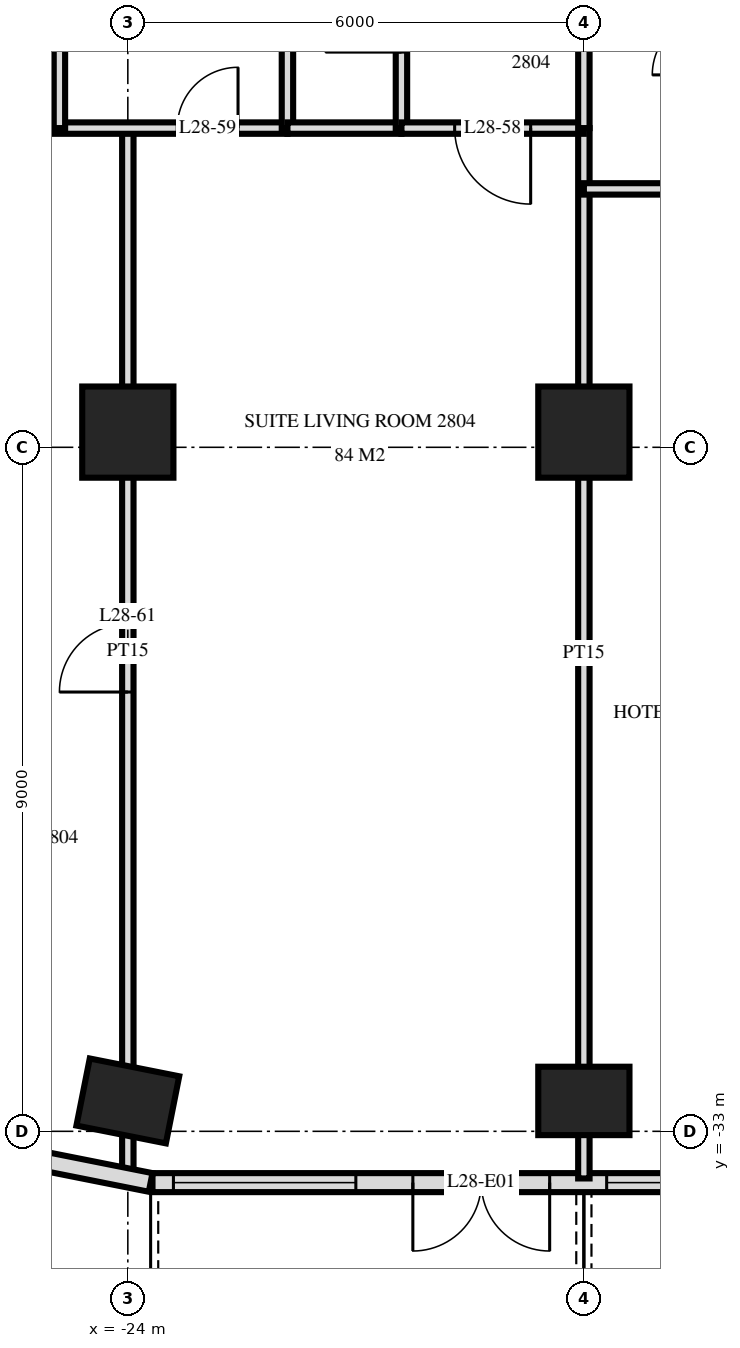
"""IFC4 building model, lengths in metres.
Left out: names, types, materials, properties, quantities, classifications, styles, units other than length and angle.
Written with IfcOpenShell. Run it as: python <this file> out.ifc"""

import sys

from ifc_helpers import new_model, si_unit, direction, frame, frame_2d, origin, origin_2d, place, context, subcontext, project, spatial, rectangle, extrude, element, fill, save


model = new_model("IFC4")
c1 = context("Model", 3, precision=1e-05, world=origin(), true_north=direction((0.0, 1.0)))
c2 = subcontext(c1, "Body", "Model", "MODEL_VIEW")
j1 = project(units=[si_unit("LENGTHUNIT", "METRE"), si_unit("PLANEANGLEUNIT", "RADIAN")], contexts=[c1])
p1 = place(None, origin())
s1 = spatial("IfcSite", under=j1, at=p1, CompositionType="ELEMENT")
p2 = place(p1, origin())
s2 = spatial("IfcBuilding", under=s1, at=p2, CompositionType="ELEMENT")
p3 = place(p2, frame((0.0, 0.0, 112.8)))
s3 = spatial("IfcBuildingStorey", under=s2, at=p3, CompositionType="ELEMENT", Elevation=112.8)
p4 = place(p3, frame((-24.0, -32.6, -0.28), z_axis=(0.0, 0.0, 1.0), x_axis=(-0.980792089743, 0.195056086032, 0.0)))
e1 = element("IfcColumn", 1, at=p4, inside=s3, PredefinedType="COLUMN", context=c2, shape_type="SweptSolid", body=[
    extrude(rectangle(XDim=1.2, YDim=0.9, at=origin_2d()), origin(), (0.0, 0.0, 1.0), 3.88),
])
p5 = place(p3, frame((-24.0, -23.8, -0.28), z_axis=(0.0, 0.0, 1.0), x_axis=(1.0, 0.0, 0.0)))
e2 = element("IfcColumn", 2, at=p5, inside=s3, PredefinedType="COLUMN", context=c2, shape_type="SweptSolid", body=[
    extrude(rectangle(XDim=1.2, YDim=1.2, at=origin_2d()), origin(), (0.0, 0.0, 1.0), 3.88),
])
p6 = place(p3, frame((-18.0, -32.6, -0.28), z_axis=(0.0, 0.0, 1.0), x_axis=(1.0, 0.0, 0.0)))
e3 = element("IfcColumn", 3, at=p6, inside=s3, PredefinedType="COLUMN", context=c2, shape_type="SweptSolid", body=[
    extrude(rectangle(XDim=1.2, YDim=0.9, at=origin_2d()), origin(), (0.0, 0.0, 1.0), 3.88),
])
p7 = place(p3, frame((-18.0, -23.8, -0.28), z_axis=(0.0, 0.0, 1.0), x_axis=(1.0, 0.0, 0.0)))
e4 = element("IfcColumn", 4, at=p7, inside=s3, PredefinedType="COLUMN", context=c2, shape_type="SweptSolid", body=[
    extrude(rectangle(XDim=1.2, YDim=1.2, at=origin_2d()), origin(), (0.0, 0.0, 1.0), 3.88),
])
p8 = place(p3, frame((-25.349, -33.344, 0.0), z_axis=(0.0, 0.0, 1.0), x_axis=(0.980775640221, -0.19513878023, 0.0)))
e5 = element("IfcWall", 5, at=p8, inside=s3, PredefinedType="SOLIDWALL", context=c2, shape_type="SweptSolid", body=[
    extrude(rectangle(XDim=1.681, YDim=0.25, at=frame_2d((0.841, 0.0))), origin(), (0.0, 0.0, 1.0), 3.32),
])
p9 = place(p3, frame((-23.675, -33.675, 0.0), z_axis=(0.0, 0.0, 1.0), x_axis=(1.0, 0.0, 0.0)))
e6 = element("IfcWall", 6, at=p9, inside=s3, PredefinedType="SOLIDWALL", context=c2, shape_type="SweptSolid", body=[
    extrude(rectangle(XDim=47.351, YDim=0.25, at=frame_2d((23.675, 0.0))), origin(), (0.0, 0.0, 1.0), 3.32),
])
p10 = place(p9, frame((0.275, 0.0, 0.3)))
e7 = element("IfcOpeningElement", 7, at=p10, cuts=e6, PredefinedType="OPENING", context=c2, shape_type="SweptSolid", body=[
    extrude(rectangle(XDim=2.4, YDim=2.1, at=frame_2d((1.2, 1.05))), frame((0.0, 0.135, 0.0), z_axis=(0.0, -1.0, 0.0), x_axis=(1.0, 0.0, 0.0)), (0.0, 0.0, 1.0), 0.27),
])
p11 = place(p9, frame((3.425, 0.0, 0.0)))
e8 = element("IfcOpeningElement", 8, at=p11, cuts=e6, PredefinedType="OPENING", context=c2, shape_type="SweptSolid", body=[
    extrude(rectangle(XDim=1.8, YDim=2.4, at=frame_2d((0.9, 1.2))), frame((0.0, 0.135, 0.0), z_axis=(0.0, -1.0, 0.0), x_axis=(1.0, 0.0, 0.0)), (0.0, 0.0, 1.0), 0.27),
])
p12 = place(p9, frame((5.975, 0.0, 0.3)))
e9 = element("IfcOpeningElement", 9, at=p12, cuts=e6, PredefinedType="OPENING", context=c2, shape_type="SweptSolid", body=[
    extrude(rectangle(XDim=2.4, YDim=2.1, at=frame_2d((1.2, 1.05))), frame((0.0, 0.135, 0.0), z_axis=(0.0, -1.0, 0.0), x_axis=(1.0, 0.0, 0.0)), (0.0, 0.0, 1.0), 0.27),
])
p13 = place(p9, frame((9.275, 0.0, 0.0)))
e10 = element("IfcOpeningElement", 10, at=p13, cuts=e6, PredefinedType="OPENING", context=c2, shape_type="SweptSolid", body=[
    extrude(rectangle(XDim=1.8, YDim=2.4, at=frame_2d((0.9, 1.2))), frame((0.0, 0.135, 0.0), z_axis=(0.0, -1.0, 0.0), x_axis=(1.0, 0.0, 0.0)), (0.0, 0.0, 1.0), 0.27),
])
p14 = place(p9, frame((12.275, 0.0, 0.0)))
e11 = element("IfcOpeningElement", 11, at=p14, cuts=e6, PredefinedType="OPENING", context=c2, shape_type="SweptSolid", body=[
    extrude(rectangle(XDim=1.8, YDim=2.4, at=frame_2d((0.9, 1.2))), frame((0.0, 0.135, 0.0), z_axis=(0.0, -1.0, 0.0), x_axis=(1.0, 0.0, 0.0)), (0.0, 0.0, 1.0), 0.27),
])
p15 = place(p9, frame((14.975, 0.0, 0.3)))
e12 = element("IfcOpeningElement", 12, at=p15, cuts=e6, PredefinedType="OPENING", context=c2, shape_type="SweptSolid", body=[
    extrude(rectangle(XDim=2.4, YDim=2.1, at=frame_2d((1.2, 1.05))), frame((0.0, 0.135, 0.0), z_axis=(0.0, -1.0, 0.0), x_axis=(1.0, 0.0, 0.0)), (0.0, 0.0, 1.0), 0.27),
])
p16 = place(p9, frame((17.975, 0.0, 0.3)))
e13 = element("IfcOpeningElement", 13, at=p16, cuts=e6, PredefinedType="OPENING", context=c2, shape_type="SweptSolid", body=[
    extrude(rectangle(XDim=2.4, YDim=2.1, at=frame_2d((1.2, 1.05))), frame((0.0, 0.135, 0.0), z_axis=(0.0, -1.0, 0.0), x_axis=(1.0, 0.0, 0.0)), (0.0, 0.0, 1.0), 0.27),
])
p17 = place(p9, frame((21.275, 0.0, 0.0)))
e14 = element("IfcOpeningElement", 14, at=p17, cuts=e6, PredefinedType="OPENING", context=c2, shape_type="SweptSolid", body=[
    extrude(rectangle(XDim=1.8, YDim=2.4, at=frame_2d((0.9, 1.2))), frame((0.0, 0.135, 0.0), z_axis=(0.0, -1.0, 0.0), x_axis=(1.0, 0.0, 0.0)), (0.0, 0.0, 1.0), 0.27),
])
p18 = place(p9, frame((24.275, 0.0, 0.0)))
e15 = element("IfcOpeningElement", 15, at=p18, cuts=e6, PredefinedType="OPENING", context=c2, shape_type="SweptSolid", body=[
    extrude(rectangle(XDim=1.8, YDim=2.4, at=frame_2d((0.9, 1.2))), frame((0.0, 0.135, 0.0), z_axis=(0.0, -1.0, 0.0), x_axis=(1.0, 0.0, 0.0)), (0.0, 0.0, 1.0), 0.27),
])
p19 = place(p9, frame((26.975, 0.0, 0.3)))
e16 = element("IfcOpeningElement", 16, at=p19, cuts=e6, PredefinedType="OPENING", context=c2, shape_type="SweptSolid", body=[
    extrude(rectangle(XDim=2.4, YDim=2.1, at=frame_2d((1.2, 1.05))), frame((0.0, 0.135, 0.0), z_axis=(0.0, -1.0, 0.0), x_axis=(1.0, 0.0, 0.0)), (0.0, 0.0, 1.0), 0.27),
])
p20 = place(p9, frame((30.275, 0.0, 0.0)))
e17 = element("IfcOpeningElement", 17, at=p20, cuts=e6, PredefinedType="OPENING", context=c2, shape_type="SweptSolid", body=[
    extrude(rectangle(XDim=1.8, YDim=2.4, at=frame_2d((0.9, 1.2))), frame((0.0, 0.135, 0.0), z_axis=(0.0, -1.0, 0.0), x_axis=(1.0, 0.0, 0.0)), (0.0, 0.0, 1.0), 0.27),
])
p21 = place(p9, frame((32.975, 0.0, 0.3)))
e18 = element("IfcOpeningElement", 18, at=p21, cuts=e6, PredefinedType="OPENING", context=c2, shape_type="SweptSolid", body=[
    extrude(rectangle(XDim=2.4, YDim=2.1, at=frame_2d((1.2, 1.05))), frame((0.0, 0.135, 0.0), z_axis=(0.0, -1.0, 0.0), x_axis=(1.0, 0.0, 0.0)), (0.0, 0.0, 1.0), 0.27),
])
p22 = place(p9, frame((35.975, 0.0, 0.3)))
e19 = element("IfcOpeningElement", 19, at=p22, cuts=e6, PredefinedType="OPENING", context=c2, shape_type="SweptSolid", body=[
    extrude(rectangle(XDim=2.4, YDim=2.1, at=frame_2d((1.2, 1.05))), frame((0.0, 0.135, 0.0), z_axis=(0.0, -1.0, 0.0), x_axis=(1.0, 0.0, 0.0)), (0.0, 0.0, 1.0), 0.27),
])
p23 = place(p9, frame((39.275, 0.0, 0.0)))
e20 = element("IfcOpeningElement", 20, at=p23, cuts=e6, PredefinedType="OPENING", context=c2, shape_type="SweptSolid", body=[
    extrude(rectangle(XDim=1.8, YDim=2.4, at=frame_2d((0.9, 1.2))), frame((0.0, 0.135, 0.0), z_axis=(0.0, -1.0, 0.0), x_axis=(1.0, 0.0, 0.0)), (0.0, 0.0, 1.0), 0.27),
])
p24 = place(p9, frame((41.975, 0.0, 0.3)))
e21 = element("IfcOpeningElement", 21, at=p24, cuts=e6, PredefinedType="OPENING", context=c2, shape_type="SweptSolid", body=[
    extrude(rectangle(XDim=2.4, YDim=2.1, at=frame_2d((1.2, 1.05))), frame((0.0, 0.135, 0.0), z_axis=(0.0, -1.0, 0.0), x_axis=(1.0, 0.0, 0.0)), (0.0, 0.0, 1.0), 0.27),
])
p25 = place(p9, frame((45.125, 0.0, 0.0)))
e22 = element("IfcOpeningElement", 22, at=p25, cuts=e6, PredefinedType="OPENING", context=c2, shape_type="SweptSolid", body=[
    extrude(rectangle(XDim=1.8, YDim=2.4, at=frame_2d((0.9, 1.2))), frame((0.0, 0.135, 0.0), z_axis=(0.0, -1.0, 0.0), x_axis=(1.0, 0.0, 0.0)), (0.0, 0.0, 1.0), 0.27),
])
p26 = place(p3, frame((-18.0, -19.8, 0.0), z_axis=(0.0, 0.0, 1.0), x_axis=(0.0, 1.0, 0.0)))
e23 = element("IfcWall", 23, at=p26, inside=s3, PredefinedType="PARTITIONING", context=c2, shape_type="SweptSolid", body=[
    extrude(rectangle(XDim=3.0, YDim=0.15, at=frame_2d((1.5, 0.0))), origin(), (0.0, 0.0, 1.0), 3.32),
])
p27 = place(p3, frame((-18.0, -33.62, 0.0), z_axis=(0.0, 0.0, 1.0), x_axis=(0.0, 1.0, 0.0)))
e24 = element("IfcWall", 24, at=p27, inside=s3, PredefinedType="PARTITIONING", context=c2, shape_type="SweptSolid", body=[
    extrude(rectangle(XDim=13.82, YDim=0.15, at=frame_2d((6.91, 0.0))), origin(), (0.0, 0.0, 1.0), 3.32),
])
p28 = place(p3, frame((-20.4, -19.8, 0.0), z_axis=(0.0, 0.0, 1.0), x_axis=(0.0, 1.0, 0.0)))
e25 = element("IfcWall", 25, at=p28, inside=s3, PredefinedType="PARTITIONING", context=c2, shape_type="SweptSolid", body=[
    extrude(rectangle(XDim=3.0, YDim=0.15, at=frame_2d((1.5, 0.0))), origin(), (0.0, 0.0, 1.0), 3.32),
])
p29 = place(p28, frame((1.0, 0.0, 0.0)))
e26 = element("IfcOpeningElement", 26, at=p29, cuts=e25, PredefinedType="OPENING", context=c2, shape_type="SweptSolid", body=[
    extrude(rectangle(XDim=1.0, YDim=2.1, at=frame_2d((0.5, 1.05))), frame((0.0, 0.085, 0.0), z_axis=(0.0, -1.0, 0.0), x_axis=(1.0, 0.0, 0.0)), (0.0, 0.0, 1.0), 0.17),
])
p30 = place(p3, frame((-21.9, -19.8, 0.0), z_axis=(0.0, 0.0, 1.0), x_axis=(0.0, 1.0, 0.0)))
e27 = element("IfcWall", 27, at=p30, inside=s3, PredefinedType="PLUMBINGWALL", context=c2, shape_type="SweptSolid", body=[
    extrude(rectangle(XDim=3.0, YDim=0.15, at=frame_2d((1.5, 0.0))), origin(), (0.0, 0.0, 1.0), 3.32),
])
p31 = place(p3, frame((-24.0, -33.557, 0.0), z_axis=(0.0, 0.0, 1.0), x_axis=(0.0, 1.0, 0.0)))
e28 = element("IfcWall", 28, at=p31, inside=s3, PredefinedType="PARTITIONING", context=c2, shape_type="SweptSolid", body=[
    extrude(rectangle(XDim=13.757, YDim=0.15, at=frame_2d((6.878, 0.0))), origin(), (0.0, 0.0, 1.0), 3.32),
])
p32 = place(p31, frame((6.337, 0.0, 0.0)))
e29 = element("IfcOpeningElement", 29, at=p32, cuts=e28, PredefinedType="OPENING", context=c2, shape_type="SweptSolid", body=[
    extrude(rectangle(XDim=0.9, YDim=2.1, at=frame_2d((0.45, 1.05))), frame((0.0, 0.085, 0.0), z_axis=(0.0, -1.0, 0.0), x_axis=(1.0, 0.0, 0.0)), (0.0, 0.0, 1.0), 0.17),
])
p33 = place(p3, frame((-24.9, -19.8, 0.0), z_axis=(0.0, 0.0, 1.0), x_axis=(0.0, 1.0, 0.0)))
e30 = element("IfcWall", 30, at=p33, inside=s3, PredefinedType="PARTITIONING", context=c2, shape_type="SweptSolid", body=[
    extrude(rectangle(XDim=3.0, YDim=0.15, at=frame_2d((1.5, 0.0))), origin(), (0.0, 0.0, 1.0), 3.32),
])
p34 = place(p3, frame((-18.0, -20.6, 0.0), z_axis=(0.0, 0.0, 1.0), x_axis=(1.0, 0.0, 0.0)))
e31 = element("IfcWall", 31, at=p34, inside=s3, PredefinedType="PARTITIONING", context=c2, shape_type="SweptSolid", body=[
    extrude(rectangle(XDim=1.7, YDim=0.15, at=frame_2d((0.85, 0.0))), origin(), (0.0, 0.0, 1.0), 3.32),
])
p35 = place(p3, frame((-20.4, -19.8, 0.0), z_axis=(0.0, 0.0, 1.0), x_axis=(1.0, 0.0, 0.0)))
e32 = element("IfcWall", 32, at=p35, inside=s3, PredefinedType="PARTITIONING", context=c2, shape_type="SweptSolid", body=[
    extrude(rectangle(XDim=2.4, YDim=0.15, at=frame_2d((1.2, 0.0))), origin(), (0.0, 0.0, 1.0), 3.32),
])
p36 = place(p35, frame((0.7, 0.0, 0.0)))
e33 = element("IfcOpeningElement", 33, at=p36, cuts=e32, PredefinedType="OPENING", context=c2, shape_type="SweptSolid", body=[
    extrude(rectangle(XDim=1.0, YDim=2.1, at=frame_2d((0.5, 1.05))), frame((0.0, 0.085, 0.0), z_axis=(0.0, -1.0, 0.0), x_axis=(1.0, 0.0, 0.0)), (0.0, 0.0, 1.0), 0.17),
])
p37 = place(p3, frame((-28.02, -19.8, 0.0), z_axis=(0.0, 0.0, 1.0), x_axis=(1.0, 0.0, 0.0)))
e34 = element("IfcWall", 34, at=p37, inside=s3, PredefinedType="PARTITIONING", context=c2, shape_type="SweptSolid", body=[
    extrude(rectangle(XDim=6.12, YDim=0.15, at=frame_2d((3.06, 0.0))), origin(), (0.0, 0.0, 1.0), 3.32),
])
p38 = place(p37, frame((4.67, 0.0, 0.0)))
e35 = element("IfcOpeningElement", 35, at=p38, cuts=e34, PredefinedType="OPENING", context=c2, shape_type="SweptSolid", body=[
    extrude(rectangle(XDim=0.8, YDim=2.1, at=frame_2d((0.4, 1.05))), frame((0.0, 0.085, 0.0), z_axis=(0.0, -1.0, 0.0), x_axis=(1.0, 0.0, 0.0)), (0.0, 0.0, 1.0), 0.17),
])
p39 = place(p37, frame((1.02, 0.0, 0.0)))
e36 = element("IfcOpeningElement", 36, at=p39, cuts=e34, PredefinedType="OPENING", context=c2, shape_type="SweptSolid", body=[
    extrude(rectangle(XDim=0.9, YDim=2.1, at=frame_2d((0.45, 1.05))), frame((0.0, 0.085, 0.0), z_axis=(0.0, -1.0, 0.0), x_axis=(1.0, 0.0, 0.0)), (0.0, 0.0, 1.0), 0.17),
])
p40 = place(p3, frame((-21.9, -19.8, 0.0), z_axis=(0.0, 0.0, 1.0), x_axis=(1.0, 0.0, 0.0)))
e37 = element("IfcWall", 37, at=p40, inside=s3, PredefinedType="PLUMBINGWALL", context=c2, shape_type="SweptSolid", body=[
    extrude(rectangle(XDim=1.5, YDim=0.15, at=frame_2d((0.75, 0.0))), origin(), (0.0, 0.0, 1.0), 3.32),
])
p41 = place(p10, origin())
e38 = element("IfcWindow", 38, at=p41, inside=s3, PartitioningType="SINGLE_PANEL", PredefinedType="WINDOW", context=c2, shape_type="SweptSolid", body=[
    extrude(rectangle(XDim=2.4, YDim=2.1, at=frame_2d((1.2, 1.05))), frame((0.0, 0.03, 0.0), z_axis=(0.0, -1.0, 0.0), x_axis=(1.0, 0.0, 0.0)), (0.0, 0.0, 1.0), 0.06),
])
fill(e7, e38)
p42 = place(p11, frame((0.9, 0.0, 0.0), z_axis=(0.0, 0.0, 1.0), x_axis=(-1.0, 0.0, 0.0)))
e39 = element("IfcDoor", 39, at=p42, inside=s3, OperationType="DOUBLE_DOOR_SINGLE_SWING", PredefinedType="DOOR", context=c2, shape_type="SweptSolid", body=[
    extrude(rectangle(XDim=1.8, YDim=2.4, at=frame_2d((0.0, 1.2))), frame((0.0, -0.025, 0.0), z_axis=(0.0, 1.0, 0.0), x_axis=(-1.0, 0.0, 0.0)), (0.0, 0.0, 1.0), 0.05),
])
fill(e8, e39)
p43 = place(p12, origin())
e40 = element("IfcWindow", 40, at=p43, inside=s3, PartitioningType="SINGLE_PANEL", PredefinedType="WINDOW", context=c2, shape_type="SweptSolid", body=[
    extrude(rectangle(XDim=2.4, YDim=2.1, at=frame_2d((1.2, 1.05))), frame((0.0, 0.03, 0.0), z_axis=(0.0, -1.0, 0.0), x_axis=(1.0, 0.0, 0.0)), (0.0, 0.0, 1.0), 0.06),
])
fill(e9, e40)
p44 = place(p36, frame((0.5, 0.0, 0.0), z_axis=(0.0, 0.0, 1.0), x_axis=(-1.0, 0.0, 0.0)))
e41 = element("IfcDoor", 41, at=p44, inside=s3, OperationType="SINGLE_SWING_RIGHT", PredefinedType="DOOR", context=c2, shape_type="SweptSolid", body=[
    extrude(rectangle(XDim=1.0, YDim=2.1, at=frame_2d((0.0, 1.05))), frame((0.0, -0.025, 0.0), z_axis=(0.0, 1.0, 0.0), x_axis=(-1.0, 0.0, 0.0)), (0.0, 0.0, 1.0), 0.05),
])
fill(e33, e41)
p45 = place(p38, origin())
e42 = element("IfcDoor", 42, at=p45, inside=s3, OperationType="SINGLE_SWING_LEFT", PredefinedType="DOOR", context=c2, shape_type="SweptSolid", body=[
    extrude(rectangle(XDim=0.8, YDim=2.1, at=frame_2d((0.4, 1.05))), frame((0.0, 0.025, 0.0), z_axis=(0.0, -1.0, 0.0), x_axis=(1.0, 0.0, 0.0)), (0.0, 0.0, 1.0), 0.05),
])
fill(e35, e42)
p46 = place(p32, origin())
e43 = element("IfcDoor", 43, at=p46, inside=s3, OperationType="SINGLE_SWING_RIGHT", PredefinedType="DOOR", context=c2, shape_type="SweptSolid", body=[
    extrude(rectangle(XDim=0.9, YDim=2.1, at=frame_2d((0.45, 1.05))), frame((0.0, 0.025, 0.0), z_axis=(0.0, -1.0, 0.0), x_axis=(1.0, 0.0, 0.0)), (0.0, 0.0, 1.0), 0.05),
])
fill(e29, e43)
save(model, sys.argv[1])
